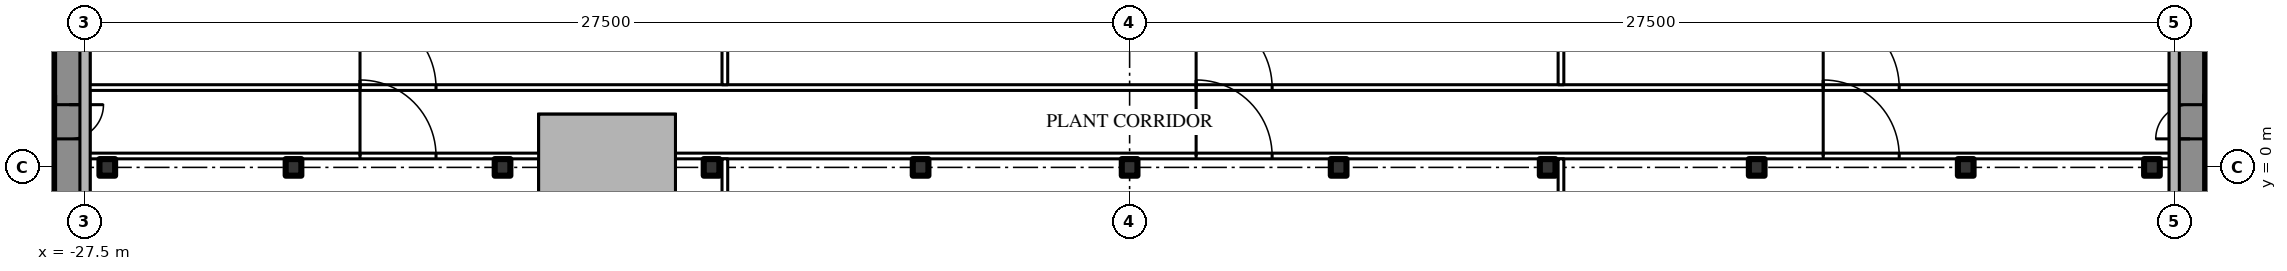
"""IFC4 building model, lengths in metres.
Left out: names, types, materials, properties, quantities, classifications, styles, units other than length and angle.
Written with IfcOpenShell. Run it as: python <this file> out.ifc"""

import sys

from ifc_helpers import new_model, si_unit, direction, frame, frame_2d, origin, origin_2d, place, context, subcontext, project, spatial, rectangle, i_section, extrude, element, fill, save


model = new_model("IFC4")
c1 = context("Model", 3, precision=1e-05, world=origin(), true_north=direction((0.0, 1.0)))
c2 = subcontext(c1, "Body", "Model", "MODEL_VIEW")
j1 = project(units=[si_unit("LENGTHUNIT", "METRE"), si_unit("PLANEANGLEUNIT", "RADIAN")], contexts=[c1])
p1 = place(None, origin())
s1 = spatial("IfcSite", under=j1, at=p1, CompositionType="ELEMENT")
p2 = place(p1, origin())
s2 = spatial("IfcBuilding", under=s1, at=p2, CompositionType="ELEMENT")
p3 = place(p2, frame((0.0, 0.0, 268.3)))
s3 = spatial("IfcBuildingStorey", under=s2, at=p3, CompositionType="ELEMENT", Elevation=268.3)
p4 = place(p3, frame((-27.9, 8.6, 0.0), z_axis=(0.0, 0.0, 1.0), x_axis=(0.0, -1.0, 0.0)))
e1 = element("IfcWall", 1, at=p4, inside=s3, PredefinedType="SHEAR", context=c2, shape_type="SweptSolid", body=[
    extrude(rectangle(XDim=17.2, YDim=0.8, at=frame_2d((8.6, 0.0))), origin(), (0.0, 0.0, 1.0), 5.0),
])
p5 = place(p4, frame((6.95, 0.0, 0.0)))
e2 = element("IfcOpeningElement", 2, at=p5, cuts=e1, PredefinedType="OPENING", context=c2, shape_type="SweptSolid", body=[
    extrude(rectangle(XDim=0.9, YDim=2.2, at=frame_2d((0.45, 1.1))), frame((0.0, 0.41, 0.0), z_axis=(0.0, -1.0, 0.0), x_axis=(1.0, 0.0, 0.0)), (0.0, 0.0, 1.0), 0.82),
])
p6 = place(p3, frame((-28.3, 1.775, 0.0), z_axis=(0.0, 0.0, 1.0), x_axis=(-1.0, 0.0, 0.0)))
e3 = element("IfcWall", 3, at=p6, inside=s3, PredefinedType="SHEAR", context=c2, shape_type="SweptSolid", body=[
    extrude(rectangle(XDim=2.9, YDim=0.25, at=frame_2d((1.45, 0.0))), origin(), (0.0, 0.0, 1.0), 5.0),
])
p7 = place(p3, frame((-27.2, 14.3, 0.0), z_axis=(0.0, 0.0, 1.0), x_axis=(-0.866026593062, -0.499997940104, 0.0)))
e4 = element("IfcWall", 4, at=p7, inside=s3, PredefinedType="SHEAR", context=c2, shape_type="SweptSolid", body=[
    extrude(rectangle(XDim=28.946, YDim=1.2, at=frame_2d((14.473, 0.0))), origin(), (0.0, 0.0, 1.0), 5.0),
])
p8 = place(p7, frame((4.6, 0.0, 0.0)))
e5 = element("IfcOpeningElement", 5, at=p8, cuts=e4, PredefinedType="OPENING", context=c2, shape_type="SweptSolid", body=[
    extrude(rectangle(XDim=1.0, YDim=2.2, at=frame_2d((0.5, 1.1))), frame((0.0, 0.61, 0.0), z_axis=(0.0, -1.0, 0.0), x_axis=(1.0, 0.0, 0.0)), (0.0, 0.0, 1.0), 1.22),
])
p9 = place(p7, frame((13.395, 0.0, 0.0)))
e6 = element("IfcOpeningElement", 6, at=p9, cuts=e4, PredefinedType="OPENING", context=c2, shape_type="SweptSolid", body=[
    extrude(rectangle(XDim=1.8, YDim=2.2, at=frame_2d((0.9, 1.1))), frame((0.0, 0.61, 0.0), z_axis=(0.0, -1.0, 0.0), x_axis=(1.0, 0.0, 0.0)), (0.0, 0.0, 1.0), 1.22),
])
p10 = place(p3, frame((-27.2, -14.3, 0.0), z_axis=(0.0, 0.0, 1.0), x_axis=(-0.866024021859, 0.500002393557, 0.0)))
e7 = element("IfcWall", 7, at=p10, inside=s3, PredefinedType="SHEAR", context=c2, shape_type="SweptSolid", body=[
    extrude(rectangle(XDim=27.907, YDim=1.2, at=frame_2d((13.954, 0.0))), origin(), (0.0, 0.0, 1.0), 5.0),
])
p11 = place(p10, frame((4.6, 0.0, 0.0)))
e8 = element("IfcOpeningElement", 8, at=p11, cuts=e7, PredefinedType="OPENING", context=c2, shape_type="SweptSolid", body=[
    extrude(rectangle(XDim=1.0, YDim=2.2, at=frame_2d((0.5, 1.1))), frame((0.0, 0.61, 0.0), z_axis=(0.0, -1.0, 0.0), x_axis=(1.0, 0.0, 0.0)), (0.0, 0.0, 1.0), 1.22),
])
p12 = place(p10, frame((13.395, 0.0, 0.0)))
e9 = element("IfcOpeningElement", 9, at=p12, cuts=e7, PredefinedType="OPENING", context=c2, shape_type="SweptSolid", body=[
    extrude(rectangle(XDim=1.8, YDim=2.2, at=frame_2d((0.9, 1.1))), frame((0.0, 0.61, 0.0), z_axis=(0.0, -1.0, 0.0), x_axis=(1.0, 0.0, 0.0)), (0.0, 0.0, 1.0), 1.22),
])
p13 = place(p3, frame((27.9, -8.6, 0.0), z_axis=(0.0, 0.0, 1.0), x_axis=(0.0, 1.0, 0.0)))
e10 = element("IfcWall", 10, at=p13, inside=s3, PredefinedType="SHEAR", context=c2, shape_type="SweptSolid", body=[
    extrude(rectangle(XDim=17.2, YDim=0.8, at=frame_2d((8.6, 0.0))), origin(), (0.0, 0.0, 1.0), 5.0),
])
p14 = place(p13, frame((9.35, 0.0, 0.0)))
e11 = element("IfcOpeningElement", 11, at=p14, cuts=e10, PredefinedType="OPENING", context=c2, shape_type="SweptSolid", body=[
    extrude(rectangle(XDim=0.9, YDim=2.2, at=frame_2d((0.45, 1.1))), frame((0.0, 0.41, 0.0), z_axis=(0.0, -1.0, 0.0), x_axis=(1.0, 0.0, 0.0)), (0.0, 0.0, 1.0), 0.82),
])
p15 = place(p3, frame((28.3, 1.775, 0.0), z_axis=(0.0, 0.0, 1.0), x_axis=(1.0, 0.0, 0.0)))
e12 = element("IfcWall", 12, at=p15, inside=s3, PredefinedType="SHEAR", context=c2, shape_type="SweptSolid", body=[
    extrude(rectangle(XDim=2.9, YDim=0.25, at=frame_2d((1.45, 0.0))), origin(), (0.0, 0.0, 1.0), 5.0),
])
p16 = place(p3, frame((27.2, -13.8, 0.0), z_axis=(0.0, 0.0, 1.0), x_axis=(0.866027159892, 0.499996958321, 0.0)))
e13 = element("IfcWall", 13, at=p16, inside=s3, PredefinedType="SHEAR", context=c2, shape_type="SweptSolid", body=[
    extrude(rectangle(XDim=27.947, YDim=1.2, at=frame_2d((13.973, 0.0))), origin(), (0.0, 0.0, 1.0), 5.0),
])
p17 = place(p16, frame((4.6, 0.0, 0.0)))
e14 = element("IfcOpeningElement", 14, at=p17, cuts=e13, PredefinedType="OPENING", context=c2, shape_type="SweptSolid", body=[
    extrude(rectangle(XDim=1.0, YDim=2.2, at=frame_2d((0.5, 1.1))), frame((0.0, 0.61, 0.0), z_axis=(0.0, -1.0, 0.0), x_axis=(1.0, 0.0, 0.0)), (0.0, 0.0, 1.0), 1.22),
])
p18 = place(p16, frame((13.395, 0.0, 0.0)))
e15 = element("IfcOpeningElement", 15, at=p18, cuts=e13, PredefinedType="OPENING", context=c2, shape_type="SweptSolid", body=[
    extrude(rectangle(XDim=1.8, YDim=2.2, at=frame_2d((0.9, 1.1))), frame((0.0, 0.61, 0.0), z_axis=(0.0, -1.0, 0.0), x_axis=(1.0, 0.0, 0.0)), (0.0, 0.0, 1.0), 1.22),
])
p19 = place(p3, frame((27.2, 13.8, 0.0), z_axis=(0.0, 0.0, 1.0), x_axis=(0.866024515034, -0.500001539357, 0.0)))
e16 = element("IfcWall", 16, at=p19, inside=s3, PredefinedType="SHEAR", context=c2, shape_type="SweptSolid", body=[
    extrude(rectangle(XDim=26.907, YDim=1.2, at=frame_2d((13.454, 0.0))), origin(), (0.0, 0.0, 1.0), 5.0),
])
p20 = place(p19, frame((4.6, 0.0, 0.0)))
e17 = element("IfcOpeningElement", 17, at=p20, cuts=e16, PredefinedType="OPENING", context=c2, shape_type="SweptSolid", body=[
    extrude(rectangle(XDim=1.0, YDim=2.2, at=frame_2d((0.5, 1.1))), frame((0.0, 0.61, 0.0), z_axis=(0.0, -1.0, 0.0), x_axis=(1.0, 0.0, 0.0)), (0.0, 0.0, 1.0), 1.22),
])
p21 = place(p19, frame((13.395, 0.0, 0.0)))
e18 = element("IfcOpeningElement", 18, at=p21, cuts=e16, PredefinedType="OPENING", context=c2, shape_type="SweptSolid", body=[
    extrude(rectangle(XDim=1.8, YDim=2.2, at=frame_2d((0.9, 1.1))), frame((0.0, 0.61, 0.0), z_axis=(0.0, -1.0, 0.0), x_axis=(1.0, 0.0, 0.0)), (0.0, 0.0, 1.0), 1.22),
])
for number, where, z_axis, x_axis in (
    (19, (-26.9, 0.0, 0.0), (0.0, 0.0, 1.0), (1.0, 0.0, 0.0)),
    (20, (-22.0, 0.0, 0.0), (0.0, 0.0, 1.0), (1.0, 0.0, 0.0)),
    (21, (-16.5, 0.0, 0.0), (0.0, 0.0, 1.0), (1.0, 0.0, 0.0)),
    (22, (-11.0, 0.0, 0.0), (0.0, 0.0, 1.0), (1.0, 0.0, 0.0)),
    (23, (-5.5, 0.0, 0.0), (0.0, 0.0, 1.0), (1.0, 0.0, 0.0)),
    (24, (0.0, 0.0, 0.0), (0.0, 0.0, 1.0), (1.0, 0.0, 0.0)),
    (25, (5.5, 0.0, 0.0), (0.0, 0.0, 1.0), (1.0, 0.0, 0.0)),
    (26, (11.0, 0.0, 0.0), (0.0, 0.0, 1.0), (1.0, 0.0, 0.0)),
    (27, (16.5, 0.0, 0.0), (0.0, 0.0, 1.0), (1.0, 0.0, 0.0)),
    (28, (22.0, 0.0, 0.0), (0.0, 0.0, 1.0), (1.0, 0.0, 0.0)),
    (29, (26.9, 0.0, 0.0), (0.0, 0.0, 1.0), (1.0, 0.0, 0.0)),
):
    element("IfcColumn", number, at=place(p3, frame(where, z_axis=z_axis, x_axis=x_axis)), inside=s3, PredefinedType="COLUMN", context=c2, shape_type="SweptSolid", body=[
        extrude(i_section(OverallWidth=0.412, OverallDepth=0.437, WebThickness=0.036, FlangeThickness=0.058, FilletRadius=0.015, at=origin_2d()), origin(), (0.0, 0.0, 1.0), 5.0),
    ])
p22 = place(p3, frame((-11.95, 1.3, 5.0), z_axis=(0.0, 0.0, 1.0), x_axis=(-1.0, 0.0, 0.0)))
e30 = element("IfcWall", 30, at=p22, inside=s3, PredefinedType="SOLIDWALL", context=c2, shape_type="SweptSolid", body=[
    extrude(rectangle(XDim=3.6, YDim=0.2, at=frame_2d((1.8, 0.0))), origin(), (0.0, 0.0, 1.0), 2.6),
])
for number, where, z_axis, x_axis in (
    (31, (-15.45, 1.2, 5.0), (0.0, 0.0, 1.0), (0.0, -1.0, 0.0)),
    (32, (-12.05, -1.2, 5.0), (0.0, 0.0, 1.0), (0.0, 1.0, 0.0)),
):
    element("IfcWall", number, at=place(p3, frame(where, z_axis=z_axis, x_axis=x_axis)), inside=s3, PredefinedType="SOLIDWALL", context=c2, shape_type="SweptSolid", body=[
        extrude(rectangle(XDim=2.4, YDim=0.2, at=frame_2d((1.2, 0.0))), origin(), (0.0, 0.0, 1.0), 2.6),
    ])
p23 = place(p3, frame((-27.5, 0.3, 0.0), z_axis=(0.0, 0.0, 1.0), x_axis=(1.0, 0.0, 0.0)))
e33 = element("IfcWall", 33, at=p23, inside=s3, PredefinedType="PARTITIONING", context=c2, shape_type="SweptSolid", body=[
    extrude(rectangle(XDim=55.0, YDim=0.15, at=frame_2d((27.5, 0.0))), origin(), (0.0, 0.0, 1.0), 4.163),
])
p24 = place(p23, frame((7.25, 0.0, 0.0)))
e34 = element("IfcOpeningElement", 34, at=p24, cuts=e33, PredefinedType="OPENING", context=c2, shape_type="SweptSolid", body=[
    extrude(rectangle(XDim=2.0, YDim=2.4, at=frame_2d((1.0, 1.2))), frame((0.0, 0.085, 0.0), z_axis=(0.0, -1.0, 0.0), x_axis=(1.0, 0.0, 0.0)), (0.0, 0.0, 1.0), 0.17),
])
p25 = place(p23, frame((29.25, 0.0, 0.0)))
e35 = element("IfcOpeningElement", 35, at=p25, cuts=e33, PredefinedType="OPENING", context=c2, shape_type="SweptSolid", body=[
    extrude(rectangle(XDim=2.0, YDim=2.4, at=frame_2d((1.0, 1.2))), frame((0.0, 0.085, 0.0), z_axis=(0.0, -1.0, 0.0), x_axis=(1.0, 0.0, 0.0)), (0.0, 0.0, 1.0), 0.17),
])
p26 = place(p23, frame((45.75, 0.0, 0.0)))
e36 = element("IfcOpeningElement", 36, at=p26, cuts=e33, PredefinedType="OPENING", context=c2, shape_type="SweptSolid", body=[
    extrude(rectangle(XDim=2.0, YDim=2.4, at=frame_2d((1.0, 1.2))), frame((0.0, 0.085, 0.0), z_axis=(0.0, -1.0, 0.0), x_axis=(1.0, 0.0, 0.0)), (0.0, 0.0, 1.0), 0.17),
])
p27 = place(p3, frame((-27.5, 2.1, 0.0), z_axis=(0.0, 0.0, 1.0), x_axis=(1.0, 0.0, 0.0)))
e37 = element("IfcWall", 37, at=p27, inside=s3, PredefinedType="PARTITIONING", context=c2, shape_type="SweptSolid", body=[
    extrude(rectangle(XDim=55.0, YDim=0.15, at=frame_2d((27.5, 0.0))), origin(), (0.0, 0.0, 1.0), 4.7),
])
p28 = place(p27, frame((7.25, 0.0, 0.0)))
e38 = element("IfcOpeningElement", 38, at=p28, cuts=e37, PredefinedType="OPENING", context=c2, shape_type="SweptSolid", body=[
    extrude(rectangle(XDim=2.0, YDim=2.4, at=frame_2d((1.0, 1.2))), frame((0.0, 0.085, 0.0), z_axis=(0.0, -1.0, 0.0), x_axis=(1.0, 0.0, 0.0)), (0.0, 0.0, 1.0), 0.17),
])
p29 = place(p27, frame((29.25, 0.0, 0.0)))
e39 = element("IfcOpeningElement", 39, at=p29, cuts=e37, PredefinedType="OPENING", context=c2, shape_type="SweptSolid", body=[
    extrude(rectangle(XDim=2.0, YDim=2.4, at=frame_2d((1.0, 1.2))), frame((0.0, 0.085, 0.0), z_axis=(0.0, -1.0, 0.0), x_axis=(1.0, 0.0, 0.0)), (0.0, 0.0, 1.0), 0.17),
])
p30 = place(p27, frame((45.75, 0.0, 0.0)))
e40 = element("IfcOpeningElement", 40, at=p30, cuts=e37, PredefinedType="OPENING", context=c2, shape_type="SweptSolid", body=[
    extrude(rectangle(XDim=2.0, YDim=2.4, at=frame_2d((1.0, 1.2))), frame((0.0, 0.085, 0.0), z_axis=(0.0, -1.0, 0.0), x_axis=(1.0, 0.0, 0.0)), (0.0, 0.0, 1.0), 0.17),
])
for number, where, z_axis, x_axis in (
    (41, (-10.65, -12.07, 0.0), (0.0, 0.0, 1.0), (0.0, 1.0, 0.0)),
    (42, (11.35, -12.07, 0.0), (0.0, 0.0, 1.0), (0.0, 1.0, 0.0)),
):
    element("IfcWall", number, at=place(p3, frame(where, z_axis=z_axis, x_axis=x_axis)), inside=s3, PredefinedType="PARTITIONING", context=c2, shape_type="SweptSolid", body=[
        extrude(rectangle(XDim=12.295, YDim=0.15, at=frame_2d((6.147, 0.0))), origin(), (0.0, 0.0, 1.0), 4.7),
    ])
for number, where, z_axis, x_axis in (
    (43, (-10.65, 2.175, 0.0), (0.0, 0.0, 1.0), (0.0, 1.0, 0.0)),
    (44, (11.35, 2.175, 0.0), (0.0, 0.0, 1.0), (0.0, 1.0, 0.0)),
):
    element("IfcWall", number, at=place(p3, frame(where, z_axis=z_axis, x_axis=x_axis)), inside=s3, PredefinedType="PARTITIONING", context=c2, shape_type="SweptSolid", body=[
        extrude(rectangle(XDim=9.895, YDim=0.15, at=frame_2d((4.948, 0.0))), origin(), (0.0, 0.0, 1.0), 4.7),
    ])
p31 = place(p5, origin())
e45 = element("IfcDoor", 45, at=p31, inside=s3, OperationType="SINGLE_SWING_LEFT", PredefinedType="DOOR", context=c2, shape_type="SweptSolid", body=[
    extrude(rectangle(XDim=0.9, YDim=2.2, at=frame_2d((0.45, 1.1))), frame((0.0, 0.025, 0.0), z_axis=(0.0, -1.0, 0.0), x_axis=(1.0, 0.0, 0.0)), (0.0, 0.0, 1.0), 0.05),
])
fill(e2, e45)
p32 = place(p14, origin())
e46 = element("IfcDoor", 46, at=p32, inside=s3, OperationType="SINGLE_SWING_LEFT", PredefinedType="DOOR", context=c2, shape_type="SweptSolid", body=[
    extrude(rectangle(XDim=0.9, YDim=2.2, at=frame_2d((0.45, 1.1))), frame((0.0, 0.025, 0.0), z_axis=(0.0, -1.0, 0.0), x_axis=(1.0, 0.0, 0.0)), (0.0, 0.0, 1.0), 0.05),
])
fill(e11, e46)
p33 = place(p24, origin())
e47 = element("IfcDoor", 47, at=p33, inside=s3, OperationType="DOUBLE_DOOR_SINGLE_SWING", PredefinedType="DOOR", context=c2, shape_type="SweptSolid", body=[
    extrude(rectangle(XDim=2.0, YDim=2.4, at=frame_2d((1.0, 1.2))), frame((0.0, 0.025, 0.0), z_axis=(0.0, -1.0, 0.0), x_axis=(1.0, 0.0, 0.0)), (0.0, 0.0, 1.0), 0.05),
])
fill(e34, e47)
p34 = place(p25, origin())
e48 = element("IfcDoor", 48, at=p34, inside=s3, OperationType="DOUBLE_DOOR_SINGLE_SWING", PredefinedType="DOOR", context=c2, shape_type="SweptSolid", body=[
    extrude(rectangle(XDim=2.0, YDim=2.4, at=frame_2d((1.0, 1.2))), frame((0.0, 0.025, 0.0), z_axis=(0.0, -1.0, 0.0), x_axis=(1.0, 0.0, 0.0)), (0.0, 0.0, 1.0), 0.05),
])
fill(e35, e48)
p35 = place(p26, origin())
e49 = element("IfcDoor", 49, at=p35, inside=s3, OperationType="DOUBLE_DOOR_SINGLE_SWING", PredefinedType="DOOR", context=c2, shape_type="SweptSolid", body=[
    extrude(rectangle(XDim=2.0, YDim=2.4, at=frame_2d((1.0, 1.2))), frame((0.0, 0.025, 0.0), z_axis=(0.0, -1.0, 0.0), x_axis=(1.0, 0.0, 0.0)), (0.0, 0.0, 1.0), 0.05),
])
fill(e36, e49)
p36 = place(p28, origin())
e50 = element("IfcDoor", 50, at=p36, inside=s3, OperationType="DOUBLE_DOOR_SINGLE_SWING", PredefinedType="DOOR", context=c2, shape_type="SweptSolid", body=[
    extrude(rectangle(XDim=2.0, YDim=2.4, at=frame_2d((1.0, 1.2))), frame((0.0, 0.025, 0.0), z_axis=(0.0, -1.0, 0.0), x_axis=(1.0, 0.0, 0.0)), (0.0, 0.0, 1.0), 0.05),
])
fill(e38, e50)
p37 = place(p29, origin())
e51 = element("IfcDoor", 51, at=p37, inside=s3, OperationType="DOUBLE_DOOR_SINGLE_SWING", PredefinedType="DOOR", context=c2, shape_type="SweptSolid", body=[
    extrude(rectangle(XDim=2.0, YDim=2.4, at=frame_2d((1.0, 1.2))), frame((0.0, 0.025, 0.0), z_axis=(0.0, -1.0, 0.0), x_axis=(1.0, 0.0, 0.0)), (0.0, 0.0, 1.0), 0.05),
])
fill(e39, e51)
p38 = place(p30, origin())
e52 = element("IfcDoor", 52, at=p38, inside=s3, OperationType="DOUBLE_DOOR_SINGLE_SWING", PredefinedType="DOOR", context=c2, shape_type="SweptSolid", body=[
    extrude(rectangle(XDim=2.0, YDim=2.4, at=frame_2d((1.0, 1.2))), frame((0.0, 0.025, 0.0), z_axis=(0.0, -1.0, 0.0), x_axis=(1.0, 0.0, 0.0)), (0.0, 0.0, 1.0), 0.05),
])
fill(e40, e52)
save(model, sys.argv[1])
